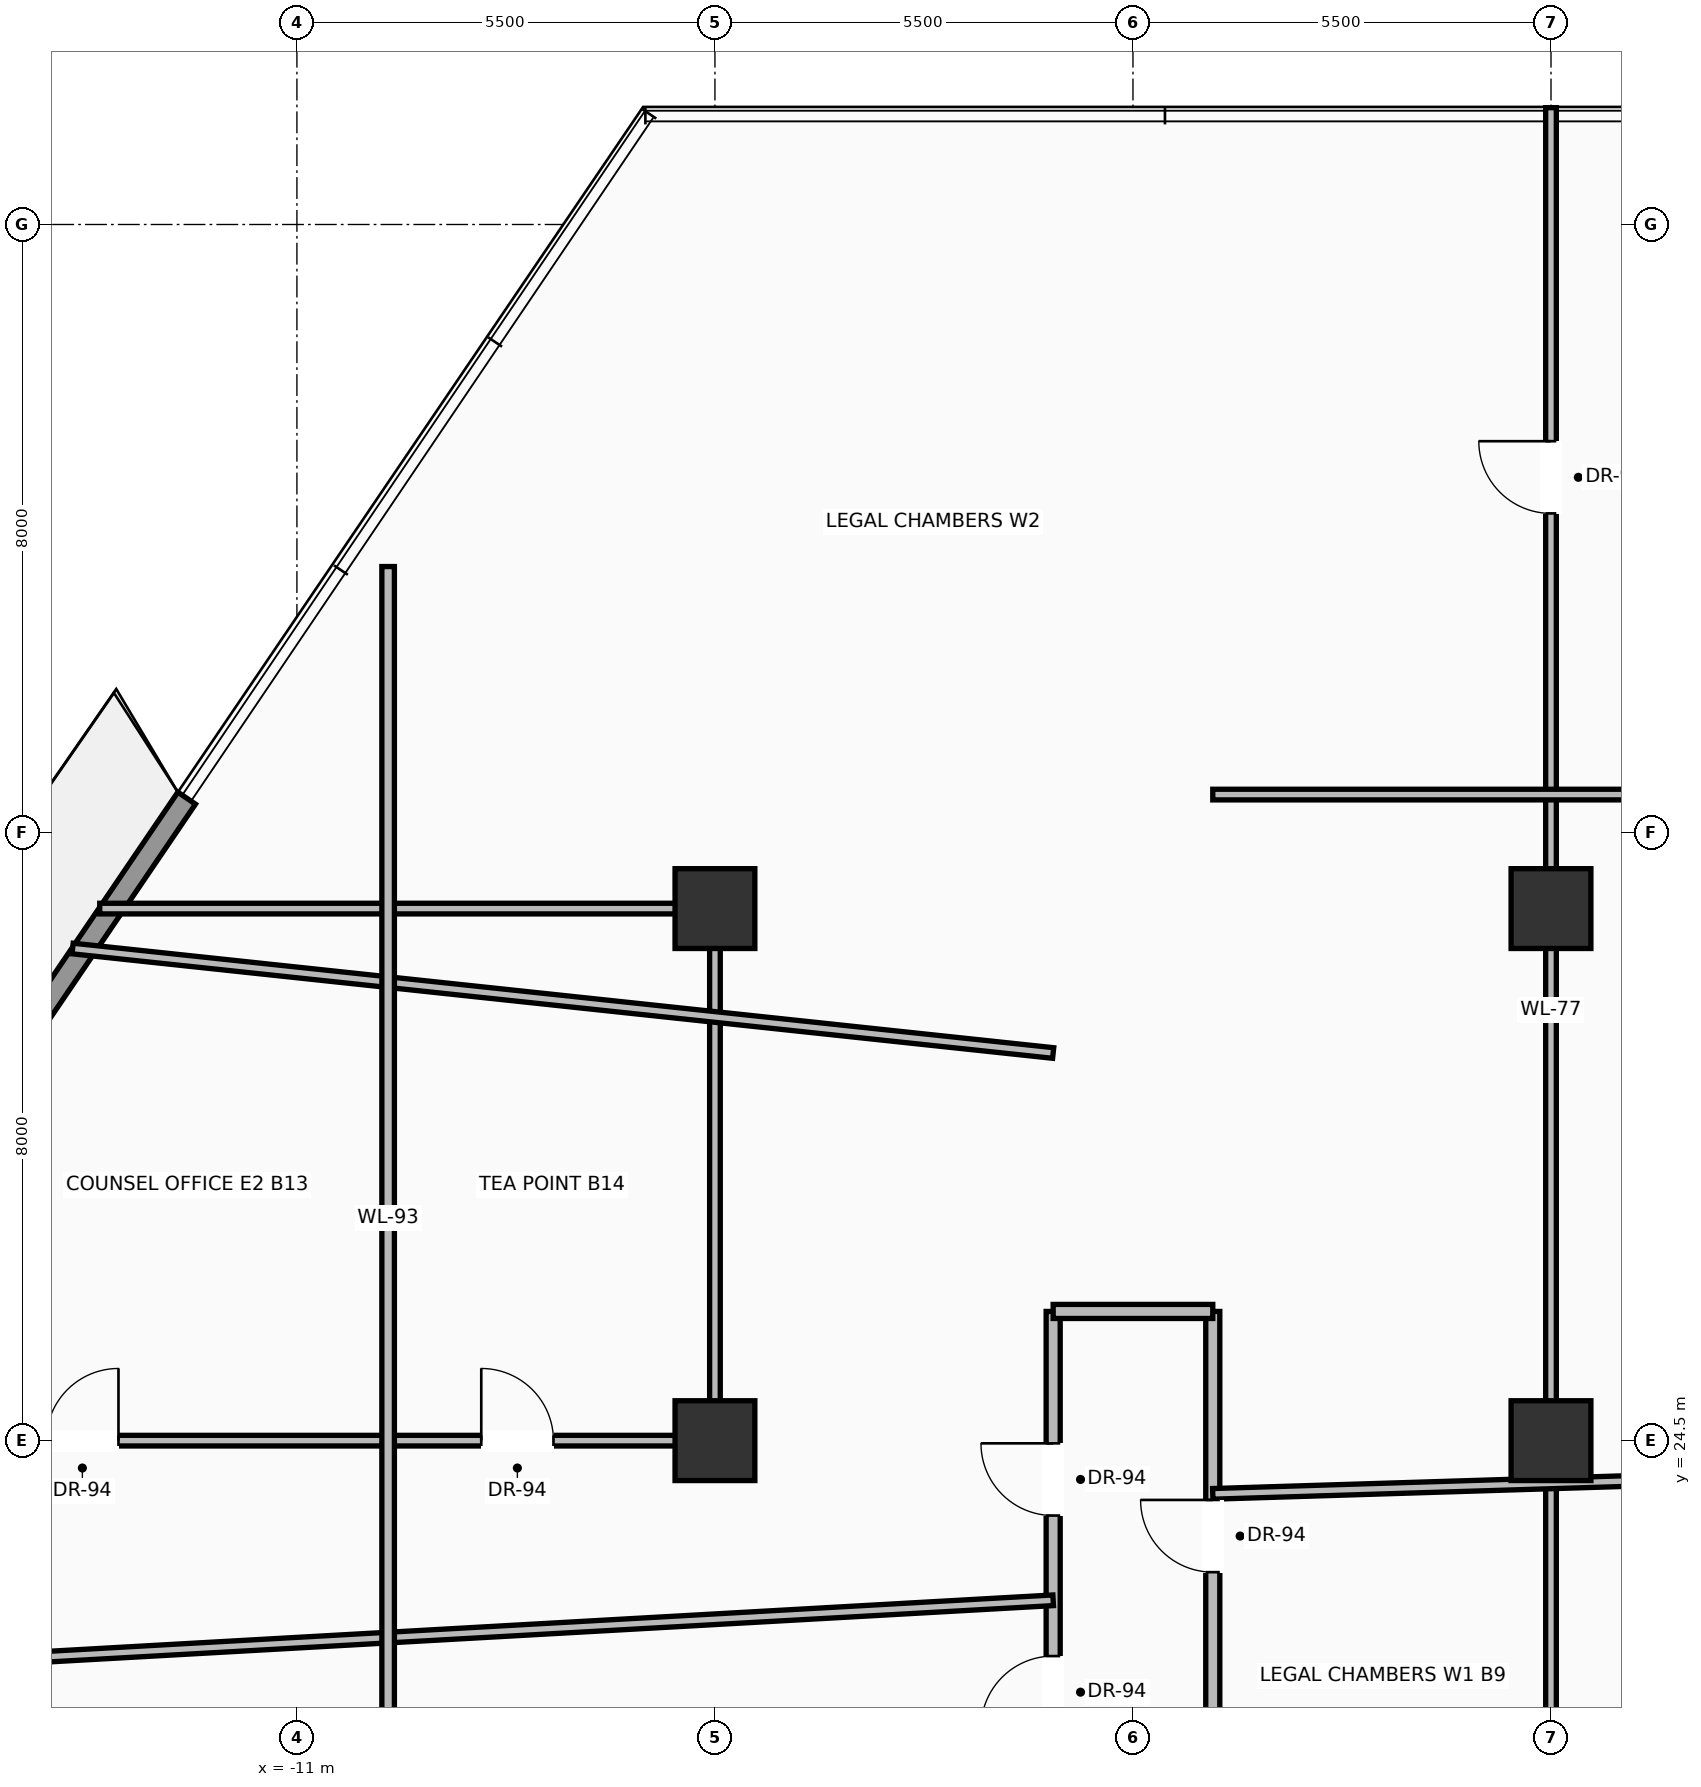
"""IFC4 building model, lengths in metres.
Left out: names, types, materials, properties, quantities, classifications, styles, units other than length and angle.
Written with IfcOpenShell. Run it as: python <this file> out.ifc"""

import sys

from ifc_helpers import new_model, si_unit, direction, frame, frame_2d, origin, origin_2d, place, context, subcontext, project, spatial, rectangle, extrude, source, transform, mapped, element, fill, save


model = new_model("IFC4")
c1 = context("Model", 3, precision=1e-05, world=origin(), true_north=direction((0.0, 1.0)))
c2 = subcontext(c1, "Body", "Model", "MODEL_VIEW")
j1 = project(units=[si_unit("LENGTHUNIT", "METRE"), si_unit("PLANEANGLEUNIT", "RADIAN")], contexts=[c1])
p1 = place(None, origin())
s1 = spatial("IfcSite", under=j1, at=p1, CompositionType="ELEMENT")
p2 = place(p1, origin())
s2 = spatial("IfcBuilding", under=s1, at=p2, CompositionType="ELEMENT")
p3 = place(p2, frame((0.0, 0.0, 68.2)))
s3 = spatial("IfcBuildingStorey", under=s2, at=p3, CompositionType="ELEMENT", Elevation=68.2)
m1 = source(origin(), c2, "Body", "SweptSolid", [
    extrude(rectangle(XDim=1.05, YDim=1.05, at=origin_2d()), origin(), (0.0, 0.0, 1.0), 3.7),
])
for number, where, z_axis, x_axis in (
    (1, (-5.5, 24.5, 0.0), (0.0, 0.0, 1.0), (1.0, 0.0, 0.0)),
    (2, (5.5, 24.5, 0.0), (0.0, 0.0, 1.0), (1.0, 0.0, 0.0)),
    (3, (-5.5, 31.5, 0.0), (0.0, 0.0, 1.0), (1.0, 0.0, 0.0)),
    (4, (5.5, 31.5, 0.0), (0.0, 0.0, 1.0), (1.0, 0.0, 0.0)),
):
    element("IfcColumn", number, at=place(p3, frame(where, z_axis=z_axis, x_axis=x_axis)), inside=s3, PredefinedType="COLUMN", context=c2, shape_type="MappedRepresentation", body=[
        mapped(m1, transform((0.0, 0.0, 0.0), scale=1.0)),
    ])
p4 = place(p3, frame((-22.07, 18.787, 0.0), z_axis=(0.0, 0.0, 1.0), x_axis=(0.561747544835, 0.827308706513, 0.0)))
e5 = element("IfcWall", 5, at=p4, inside=s3, PredefinedType="SOLIDWALL", context=c2, shape_type="SweptSolid", body=[
    extrude(rectangle(XDim=17.124, YDim=0.28, at=frame_2d((8.562, 0.0))), origin(), (0.0, 0.0, 1.0), 2.98),
])
p5 = place(p4, frame((4.11, 0.0, 0.0)))
e6 = element("IfcOpeningElement", 6, at=p5, cuts=e5, PredefinedType="OPENING", context=c2, shape_type="SweptSolid", body=[
    extrude(rectangle(XDim=1.6, YDim=2.35, at=frame_2d((0.8, 1.175))), frame((0.0, 0.15, 0.0), z_axis=(0.0, -1.0, 0.0), x_axis=(1.0, 0.0, 0.0)), (0.0, 0.0, 1.0), 0.3),
])
p6 = place(p4, frame((11.644, 0.0, 0.9)))
e7 = element("IfcOpeningElement", 7, at=p6, cuts=e5, PredefinedType="OPENING", context=c2, shape_type="SweptSolid", body=[
    extrude(rectangle(XDim=2.0, YDim=1.85, at=frame_2d((1.0, 0.925))), frame((0.0, 0.15, 0.0), z_axis=(0.0, -1.0, 0.0), x_axis=(1.0, 0.0, 0.0)), (0.0, 0.0, 1.0), 0.3),
])
p7 = place(p3, frame((-1.05, 18.85, 0.0), z_axis=(0.0, 0.0, 1.0), x_axis=(0.0, 1.0, 0.0)))
e8 = element("IfcWall", 8, at=p7, inside=s3, PredefinedType="PARTITIONING", context=c2, shape_type="SweptSolid", body=[
    extrude(rectangle(XDim=7.35, YDim=0.185, at=frame_2d((3.675, 0.0))), origin(), (0.0, 0.0, 1.0), 2.697),
])
p8 = place(p7, frame((1.866, 0.0, 0.0)))
e9 = element("IfcOpeningElement", 9, at=p8, cuts=e8, PredefinedType="OPENING", context=c2, shape_type="SweptSolid", body=[
    extrude(rectangle(XDim=0.95, YDim=2.2, at=frame_2d((0.475, 1.1))), frame((0.0, 0.103, 0.0), z_axis=(0.0, -1.0, 0.0), x_axis=(1.0, 0.0, 0.0)), (0.0, 0.0, 1.0), 0.205),
])
p9 = place(p7, frame((4.665, 0.0, 0.0)))
e10 = element("IfcOpeningElement", 10, at=p9, cuts=e8, PredefinedType="OPENING", context=c2, shape_type="SweptSolid", body=[
    extrude(rectangle(XDim=0.95, YDim=2.2, at=frame_2d((0.475, 1.1))), frame((0.0, 0.103, 0.0), z_axis=(0.0, -1.0, 0.0), x_axis=(1.0, 0.0, 0.0)), (0.0, 0.0, 1.0), 0.205),
])
p10 = place(p3, frame((1.05, 18.85, 0.0), z_axis=(0.0, 0.0, 1.0), x_axis=(0.0, 1.0, 0.0)))
e11 = element("IfcWall", 11, at=p10, inside=s3, PredefinedType="PARTITIONING", context=c2, shape_type="SweptSolid", body=[
    extrude(rectangle(XDim=7.35, YDim=0.185, at=frame_2d((3.675, 0.0))), origin(), (0.0, 0.0, 1.0), 2.697),
])
p11 = place(p10, frame((3.92, 0.0, 0.0)))
e12 = element("IfcOpeningElement", 12, at=p11, cuts=e11, PredefinedType="OPENING", context=c2, shape_type="SweptSolid", body=[
    extrude(rectangle(XDim=0.95, YDim=2.2, at=frame_2d((0.475, 1.1))), frame((0.0, 0.103, 0.0), z_axis=(0.0, -1.0, 0.0), x_axis=(1.0, 0.0, 0.0)), (0.0, 0.0, 1.0), 0.205),
])
p12 = place(p3, frame((-1.05, 26.2, 0.0), z_axis=(0.0, 0.0, 1.0), x_axis=(1.0, 0.0, 0.0)))
e13 = element("IfcWall", 13, at=p12, inside=s3, PredefinedType="PARTITIONING", context=c2, shape_type="SweptSolid", body=[
    extrude(rectangle(XDim=2.1, YDim=0.185, at=frame_2d((1.05, 0.0))), origin(), (0.0, 0.0, 1.0), 3.392),
])
p13 = place(p3, frame((5.5, 18.3, 0.0), z_axis=(0.0, 0.0, 1.0), x_axis=(0.0, 1.0, 0.0)))
e14 = element("IfcWall", 14, at=p13, inside=s3, PredefinedType="PARTITIONING", context=c2, shape_type="SweptSolid", body=[
    extrude(rectangle(XDim=23.737, YDim=0.14, at=frame_2d((11.868, 0.0))), origin(), (0.0, 0.0, 1.0), 2.697),
])
p14 = place(p13, frame((18.399, 0.0, 0.0)))
e15 = element("IfcOpeningElement", 15, at=p14, cuts=e14, PredefinedType="OPENING", context=c2, shape_type="SweptSolid", body=[
    extrude(rectangle(XDim=0.95, YDim=2.2, at=frame_2d((0.475, 1.1))), frame((0.0, 0.08, 0.0), z_axis=(0.0, -1.0, 0.0), x_axis=(1.0, 0.0, 0.0)), (0.0, 0.0, 1.0), 0.16),
])
p15 = place(p3, frame((-18.347, 24.5, 0.0), z_axis=(0.0, 0.0, 1.0), x_axis=(1.0, 0.0, 0.0)))
e16 = element("IfcWall", 16, at=p15, inside=s3, PredefinedType="PARTITIONING", context=c2, shape_type="SweptSolid", body=[
    extrude(rectangle(XDim=12.847, YDim=0.14, at=frame_2d((6.424, 0.0))), origin(), (0.0, 0.0, 1.0), 2.697),
])
p16 = place(p15, frame((4.05, 0.0, 0.0)))
e17 = element("IfcOpeningElement", 17, at=p16, cuts=e16, PredefinedType="OPENING", context=c2, shape_type="SweptSolid", body=[
    extrude(rectangle(XDim=0.95, YDim=2.2, at=frame_2d((0.475, 1.1))), frame((0.0, 0.08, 0.0), z_axis=(0.0, -1.0, 0.0), x_axis=(1.0, 0.0, 0.0)), (0.0, 0.0, 1.0), 0.16),
])
p17 = place(p15, frame((9.773, 0.0, 0.0)))
e18 = element("IfcOpeningElement", 18, at=p17, cuts=e16, PredefinedType="OPENING", context=c2, shape_type="SweptSolid", body=[
    extrude(rectangle(XDim=0.95, YDim=2.2, at=frame_2d((0.475, 1.1))), frame((0.0, 0.08, 0.0), z_axis=(0.0, -1.0, 0.0), x_axis=(1.0, 0.0, 0.0)), (0.0, 0.0, 1.0), 0.16),
])
p18 = place(p3, frame((-5.5, 24.5, 0.0), z_axis=(0.0, 0.0, 1.0), x_axis=(0.0, 1.0, 0.0)))
e19 = element("IfcWall", 19, at=p18, inside=s3, PredefinedType="PARTITIONING", context=c2, shape_type="SweptSolid", body=[
    extrude(rectangle(XDim=7.0, YDim=0.14, at=frame_2d((3.5, 0.0))), origin(), (0.0, 0.0, 1.0), 2.697),
])
p19 = place(p3, frame((-13.594, 31.5, 0.0), z_axis=(0.0, 0.0, 1.0), x_axis=(1.0, 0.0, 0.0)))
e20 = element("IfcWall", 20, at=p19, inside=s3, PredefinedType="PARTITIONING", context=c2, shape_type="SweptSolid", body=[
    extrude(rectangle(XDim=8.094, YDim=0.14, at=frame_2d((4.047, 0.0))), origin(), (0.0, 0.0, 1.0), 2.697),
])
p20 = place(p3, frame((-20.515, 21.308, 0.0), z_axis=(0.0, 0.0, 1.0), x_axis=(0.998430618399, 0.056002680683, 0.0)))
e21 = element("IfcWall", 21, at=p20, inside=s3, PredefinedType="PARTITIONING", context=c2, shape_type="SweptSolid", body=[
    extrude(rectangle(XDim=19.495, YDim=0.14, at=frame_2d((9.748, 0.0))), origin(), (0.0, 0.0, 1.0), 2.697),
])
p21 = place(p20, frame((5.195, 0.0, 0.0)))
e22 = element("IfcOpeningElement", 22, at=p21, cuts=e21, PredefinedType="OPENING", context=c2, shape_type="SweptSolid", body=[
    extrude(rectangle(XDim=0.95, YDim=2.2, at=frame_2d((0.475, 1.1))), frame((0.0, 0.08, 0.0), z_axis=(0.0, -1.0, 0.0), x_axis=(1.0, 0.0, 0.0)), (0.0, 0.0, 1.0), 0.16),
])
p22 = place(p3, frame((-13.951, 30.975, 0.0), z_axis=(0.0, 0.0, 1.0), x_axis=(0.994372265015, -0.105942430446, 0.0)))
e23 = element("IfcWall", 23, at=p22, inside=s3, PredefinedType="PARTITIONING", context=c2, shape_type="SweptSolid", body=[
    extrude(rectangle(XDim=12.974, YDim=0.14, at=frame_2d((6.487, 0.0))), origin(), (0.0, 0.0, 1.0), 2.697),
])
p23 = place(p3, frame((1.05, 23.8, 0.0), z_axis=(0.0, 0.0, 1.0), x_axis=(0.99952105976, 0.030945938291, 0.0)))
e24 = element("IfcWall", 24, at=p23, inside=s3, PredefinedType="PARTITIONING", context=c2, shape_type="SweptSolid", body=[
    extrude(rectangle(XDim=17.893, YDim=0.14, at=frame_2d((8.946, 0.0))), origin(), (0.0, 0.0, 1.0), 2.697),
])
p24 = place(p23, frame((8.08, 0.0, 0.0)))
e25 = element("IfcOpeningElement", 25, at=p24, cuts=e24, PredefinedType="OPENING", context=c2, shape_type="SweptSolid", body=[
    extrude(rectangle(XDim=0.95, YDim=2.2, at=frame_2d((0.475, 1.1))), frame((0.0, 0.08, 0.0), z_axis=(0.0, -1.0, 0.0), x_axis=(1.0, 0.0, 0.0)), (0.0, 0.0, 1.0), 0.16),
])
p25 = place(p23, frame((14.187, 0.0, 0.0)))
e26 = element("IfcOpeningElement", 26, at=p25, cuts=e24, PredefinedType="OPENING", context=c2, shape_type="SweptSolid", body=[
    extrude(rectangle(XDim=0.95, YDim=2.2, at=frame_2d((0.475, 1.1))), frame((0.0, 0.08, 0.0), z_axis=(0.0, -1.0, 0.0), x_axis=(1.0, 0.0, 0.0)), (0.0, 0.0, 1.0), 0.16),
])
p26 = place(p3, frame((1.05, 33.0, 0.0), z_axis=(0.0, 0.0, 1.0), x_axis=(1.0, 0.0, 0.0)))
e27 = element("IfcWall", 27, at=p26, inside=s3, PredefinedType="PARTITIONING", context=c2, shape_type="SweptSolid", body=[
    extrude(rectangle(XDim=12.187, YDim=0.14, at=frame_2d((6.093, 0.0))), origin(), (0.0, 0.0, 1.0), 2.697),
])
p27 = place(p3, frame((-9.8, 18.85, 0.0), z_axis=(0.0, 0.0, 1.0), x_axis=(0.0, 1.0, 0.0)))
e28 = element("IfcWall", 28, at=p27, inside=s3, PredefinedType="PARTITIONING", context=c2, shape_type="SweptSolid", body=[
    extrude(rectangle(XDim=17.15, YDim=0.165, at=frame_2d((8.575, 0.0))), origin(), (0.0, 0.0, 1.0), 2.697),
])
m2 = source(origin(), c2, "Body", "SweptSolid", [
    extrude(rectangle(XDim=0.95, YDim=2.2, at=frame_2d((0.475, 1.1))), frame((0.0, 0.025, 0.0), z_axis=(0.0, -1.0, 0.0), x_axis=(1.0, 0.0, 0.0)), (0.0, 0.0, 1.0), 0.05),
])
p28 = place(p8, origin())
e29 = element("IfcDoor", 29, at=p28, inside=s3, OperationType="SINGLE_SWING_LEFT", PredefinedType="DOOR", context=c2, shape_type="MappedRepresentation", body=[
    mapped(m2, transform((0.0, 0.0, 0.0), scale=1.0)),
])
fill(e9, e29)
p29 = place(p11, origin())
e30 = element("IfcDoor", 30, at=p29, inside=s3, OperationType="SINGLE_SWING_RIGHT", PredefinedType="DOOR", context=c2, shape_type="MappedRepresentation", body=[
    mapped(m2, transform((0.0, 0.0, 0.0), scale=1.0)),
])
fill(e12, e30)
p30 = place(p9, origin())
e31 = element("IfcDoor", 31, at=p30, inside=s3, OperationType="SINGLE_SWING_RIGHT", PredefinedType="DOOR", context=c2, shape_type="MappedRepresentation", body=[
    mapped(m2, transform((0.0, 0.0, 0.0), scale=1.0)),
])
fill(e10, e31)
p31 = place(p16, origin())
e32 = element("IfcDoor", 32, at=p31, inside=s3, OperationType="SINGLE_SWING_RIGHT", PredefinedType="DOOR", context=c2, shape_type="MappedRepresentation", body=[
    mapped(m2, transform((0.0, 0.0, 0.0), scale=1.0)),
])
fill(e17, e32)
p32 = place(p17, origin())
e33 = element("IfcDoor", 33, at=p32, inside=s3, OperationType="SINGLE_SWING_LEFT", PredefinedType="DOOR", context=c2, shape_type="MappedRepresentation", body=[
    mapped(m2, transform((0.0, 0.0, 0.0), scale=1.0)),
])
fill(e18, e33)
p33 = place(p14, origin())
e34 = element("IfcDoor", 34, at=p33, inside=s3, OperationType="SINGLE_SWING_RIGHT", PredefinedType="DOOR", context=c2, shape_type="MappedRepresentation", body=[
    mapped(m2, transform((0.0, 0.0, 0.0), scale=1.0)),
])
fill(e15, e34)
save(model, sys.argv[1])
